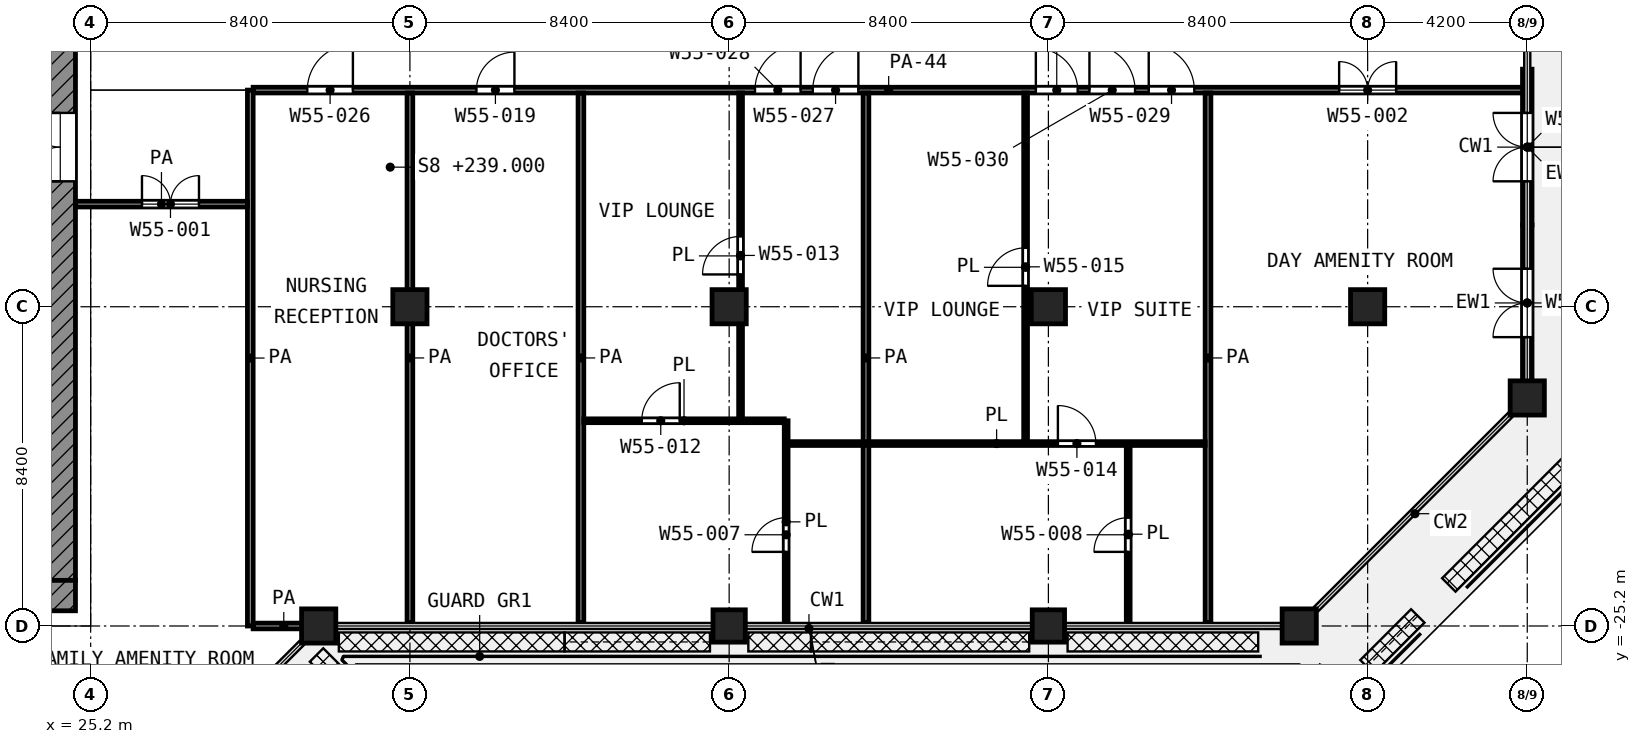
"""IFC4 building model, lengths in metres.
Left out: names, types, materials, properties, quantities, classifications, styles, units other than length and angle.
Written with IfcOpenShell. Run it as: python <this file> out.ifc"""

import sys

from ifc_helpers import new_model, si_unit, direction, frame, frame_2d, origin, origin_2d, place, context, subcontext, project, spatial, rectangle, extrude, element, fill, save


model = new_model("IFC4")
c1 = context("Model", 3, precision=1e-05, world=origin(), true_north=direction((0.0, 1.0)))
c2 = subcontext(c1, "Body", "Model", "MODEL_VIEW")
j1 = project(units=[si_unit("LENGTHUNIT", "METRE"), si_unit("PLANEANGLEUNIT", "RADIAN")], contexts=[c1])
p1 = place(None, origin())
s1 = spatial("IfcSite", under=j1, at=p1, CompositionType="ELEMENT")
p2 = place(p1, origin())
s2 = spatial("IfcBuilding", under=s1, at=p2, CompositionType="ELEMENT")
p3 = place(p2, frame((0.0, 0.0, 239.0)))
s3 = spatial("IfcBuildingStorey", under=s2, at=p3, CompositionType="ELEMENT", Elevation=239.0)
for number, where, z_axis, x_axis in (
    (1, (33.6, -16.8, 0.0), (0.0, 0.0, 1.0), (1.0, 0.0, 0.0)),
    (2, (42.0, -16.8, 0.0), (0.0, 0.0, 1.0), (1.0, 0.0, 0.0)),
    (3, (50.4, -16.8, 0.0), (0.0, 0.0, 1.0), (1.0, 0.0, 0.0)),
    (4, (58.8, -16.8, 0.0), (0.0, 0.0, 1.0), (1.0, 0.0, 0.0)),
    (5, (63.0, -19.2, 0.0), (0.0, 0.0, 1.0), (1.0, 0.0, 0.0)),
    (6, (31.2, -25.2, 0.0), (0.0, 0.0, 1.0), (1.0, 0.0, 0.0)),
):
    element("IfcColumn", number, at=place(p3, frame(where, z_axis=z_axis, x_axis=x_axis)), inside=s3, PredefinedType="COLUMN", context=c2, shape_type="SweptSolid", body=[
        extrude(rectangle(XDim=0.9, YDim=0.9, at=origin_2d()), origin(), (0.0, 0.0, 1.0), 4.2),
    ])
for number, where, z_axis, x_axis in (
    (7, (42.0, -25.2, 0.0), (0.0, 0.0, 1.0), (1.0, 0.0, 0.0)),
    (8, (50.4, -25.2, 0.0), (0.0, 0.0, 1.0), (1.0, 0.0, 0.0)),
):
    element("IfcColumn", number, at=place(p3, frame(where, z_axis=z_axis, x_axis=x_axis)), inside=s3, PredefinedType="COLUMN", context=c2, shape_type="SweptSolid", body=[
        extrude(rectangle(XDim=0.85, YDim=0.85, at=origin_2d()), origin(), (0.0, 0.0, 1.0), 4.2),
    ])
p4 = place(p3, frame((57.0, -25.2, 0.0), z_axis=(0.0, 0.0, 1.0), x_axis=(1.0, 0.0, 0.0)))
e9 = element("IfcColumn", 9, at=p4, inside=s3, PredefinedType="COLUMN", context=c2, shape_type="SweptSolid", body=[
    extrude(rectangle(XDim=0.9, YDim=0.9, at=origin_2d()), origin(), (0.0, 0.0, 1.0), 4.2),
])
p5 = place(p3, frame((63.0, -18.75, 0.0), z_axis=(0.0, 0.0, 1.0), x_axis=(0.0, 1.0, 0.0)))
e10 = element("IfcWall", 10, at=p5, inside=s3, PredefinedType="SOLIDWALL", context=c2, shape_type="SweptSolid", body=[
    extrude(rectangle(XDim=4.1, YDim=0.25, at=frame_2d((2.05, 0.0))), origin(), (0.0, 0.0, 1.0), 2.58),
])
p6 = place(p5, frame((1.15, 0.0, 0.0)))
e11 = element("IfcOpeningElement", 11, at=p6, cuts=e10, PredefinedType="OPENING", context=c2, shape_type="SweptSolid", body=[
    extrude(rectangle(XDim=1.8, YDim=2.1, at=frame_2d((0.9, 1.05))), frame((0.0, 0.135, 0.0), z_axis=(0.0, -1.0, 0.0), x_axis=(1.0, 0.0, 0.0)), (0.0, 0.0, 1.0), 0.27),
])
p7 = place(p3, frame((63.0, -14.65, 0.0), z_axis=(0.0, 0.0, 1.0), x_axis=(0.0, 1.0, 0.0)))
e12 = element("IfcWall", 12, at=p7, inside=s3, PredefinedType="SOLIDWALL", context=c2, shape_type="SweptSolid", body=[
    extrude(rectangle(XDim=4.1, YDim=0.25, at=frame_2d((2.05, 0.0))), origin(), (0.0, 0.0, 1.0), 2.58),
])
p8 = place(p7, frame((1.15, 0.0, 0.0)))
e13 = element("IfcOpeningElement", 13, at=p8, cuts=e12, PredefinedType="OPENING", context=c2, shape_type="SweptSolid", body=[
    extrude(rectangle(XDim=1.8, YDim=2.1, at=frame_2d((0.9, 1.05))), frame((0.0, 0.135, 0.0), z_axis=(0.0, -1.0, 0.0), x_axis=(1.0, 0.0, 0.0)), (0.0, 0.0, 1.0), 0.27),
])
p9 = place(p3, frame((24.4, -24.0, 0.0), z_axis=(0.0, 0.0, 1.0), x_axis=(0.0, 1.0, 0.0)))
e14 = element("IfcWall", 14, at=p9, inside=s3, PredefinedType="SHEAR", context=c2, shape_type="SweptSolid", body=[
    extrude(rectangle(XDim=18.6, YDim=0.8, at=frame_2d((9.3, 0.0))), origin(), (0.0, 0.0, 1.0), 3.6),
])
p10 = place(p9, frame((10.5, 0.0, 0.0)))
e15 = element("IfcOpeningElement", 15, at=p10, cuts=e14, PredefinedType="OPENING", context=c2, shape_type="SweptSolid", body=[
    extrude(rectangle(XDim=1.8, YDim=2.1, at=frame_2d((0.9, 1.05))), frame((0.0, 0.41, 0.0), z_axis=(0.0, -1.0, 0.0), x_axis=(1.0, 0.0, 0.0)), (0.0, 0.0, 1.0), 0.82),
])
p11 = place(p3, frame((24.4, -24.8, 0.0), z_axis=(0.0, 0.0, 1.0), x_axis=(0.0, 1.0, 0.0)))
e16 = element("IfcWall", 16, at=p11, inside=s3, PredefinedType="SHEAR", context=c2, shape_type="SweptSolid", body=[
    extrude(rectangle(XDim=0.8, YDim=0.8, at=frame_2d((0.4, 0.0))), origin(), (0.0, 0.0, 1.0), 3.6),
])
p12 = place(p3, frame((43.55, -20.4, 0.0), z_axis=(0.0, 0.0, 1.0), x_axis=(1.0, 0.0, 0.0)))
e17 = element("IfcWall", 17, at=p12, inside=s3, PredefinedType="PARTITIONING", context=c2, shape_type="SweptSolid", body=[
    extrude(rectangle(XDim=10.975, YDim=0.1, at=frame_2d((5.487, 0.0))), origin(), (0.0, 0.0, 1.0), 3.6),
])
p13 = place(p12, frame((7.1, 0.0, 0.0)))
e18 = element("IfcOpeningElement", 18, at=p13, cuts=e17, PredefinedType="OPENING", context=c2, shape_type="SweptSolid", body=[
    extrude(rectangle(XDim=1.0, YDim=2.1, at=frame_2d((0.5, 1.05))), frame((0.0, 0.06, 0.0), z_axis=(0.0, -1.0, 0.0), x_axis=(1.0, 0.0, 0.0)), (0.0, 0.0, 1.0), 0.12),
])
p14 = place(p3, frame((38.175, -19.8, 0.0), z_axis=(0.0, 0.0, 1.0), x_axis=(1.0, 0.0, 0.0)))
e19 = element("IfcWall", 19, at=p14, inside=s3, PredefinedType="PARTITIONING", context=c2, shape_type="SweptSolid", body=[
    extrude(rectangle(XDim=5.275, YDim=0.1, at=frame_2d((2.637, 0.0))), origin(), (0.0, 0.0, 1.0), 3.6),
])
p15 = place(p14, frame((1.525, 0.0, 0.0)))
e20 = element("IfcOpeningElement", 20, at=p15, cuts=e19, PredefinedType="OPENING", context=c2, shape_type="SweptSolid", body=[
    extrude(rectangle(XDim=1.0, YDim=2.1, at=frame_2d((0.5, 1.05))), frame((0.0, 0.06, 0.0), z_axis=(0.0, -1.0, 0.0), x_axis=(1.0, 0.0, 0.0)), (0.0, 0.0, 1.0), 0.12),
])
p16 = place(p3, frame((42.3, -19.75, 0.0), z_axis=(0.0, 0.0, 1.0), x_axis=(0.0, 1.0, 0.0)))
e21 = element("IfcWall", 21, at=p16, inside=s3, PredefinedType="PARTITIONING", context=c2, shape_type="SweptSolid", body=[
    extrude(rectangle(XDim=8.575, YDim=0.1, at=frame_2d((4.288, 0.0))), origin(), (0.0, 0.0, 1.0), 3.6),
])
p17 = place(p16, frame((3.8, 0.0, 0.0)))
e22 = element("IfcOpeningElement", 22, at=p17, cuts=e21, PredefinedType="OPENING", context=c2, shape_type="SweptSolid", body=[
    extrude(rectangle(XDim=1.0, YDim=2.1, at=frame_2d((0.5, 1.05))), frame((0.0, 0.06, 0.0), z_axis=(0.0, -1.0, 0.0), x_axis=(1.0, 0.0, 0.0)), (0.0, 0.0, 1.0), 0.12),
])
p18 = place(p3, frame((43.5, -25.12, 0.0), z_axis=(0.0, 0.0, 1.0), x_axis=(0.0, 1.0, 0.0)))
e23 = element("IfcWall", 23, at=p18, inside=s3, PredefinedType="PARTITIONING", context=c2, shape_type="SweptSolid", body=[
    extrude(rectangle(XDim=5.32, YDim=0.1, at=frame_2d((2.66, 0.0))), origin(), (0.0, 0.0, 1.0), 3.6),
])
p19 = place(p18, frame((1.87, 0.0, 0.0)))
e24 = element("IfcOpeningElement", 24, at=p19, cuts=e23, PredefinedType="OPENING", context=c2, shape_type="SweptSolid", body=[
    extrude(rectangle(XDim=0.9, YDim=2.1, at=frame_2d((0.45, 1.05))), frame((0.0, 0.06, 0.0), z_axis=(0.0, -1.0, 0.0), x_axis=(1.0, 0.0, 0.0)), (0.0, 0.0, 1.0), 0.12),
])
p20 = place(p3, frame((49.8, -20.35, 0.0), z_axis=(0.0, 0.0, 1.0), x_axis=(0.0, 1.0, 0.0)))
e25 = element("IfcWall", 25, at=p20, inside=s3, PredefinedType="PARTITIONING", context=c2, shape_type="SweptSolid", body=[
    extrude(rectangle(XDim=9.175, YDim=0.1, at=frame_2d((4.587, 0.0))), origin(), (0.0, 0.0, 1.0), 3.6),
])
p21 = place(p20, frame((4.1, 0.0, 0.0)))
e26 = element("IfcOpeningElement", 26, at=p21, cuts=e25, PredefinedType="OPENING", context=c2, shape_type="SweptSolid", body=[
    extrude(rectangle(XDim=1.0, YDim=2.1, at=frame_2d((0.5, 1.05))), frame((0.0, 0.06, 0.0), z_axis=(0.0, -1.0, 0.0), x_axis=(1.0, 0.0, 0.0)), (0.0, 0.0, 1.0), 0.12),
])
p22 = place(p3, frame((52.5, -25.12, 0.0), z_axis=(0.0, 0.0, 1.0), x_axis=(0.0, 1.0, 0.0)))
e27 = element("IfcWall", 27, at=p22, inside=s3, PredefinedType="PARTITIONING", context=c2, shape_type="SweptSolid", body=[
    extrude(rectangle(XDim=4.67, YDim=0.1, at=frame_2d((2.335, 0.0))), origin(), (0.0, 0.0, 1.0), 3.6),
])
p23 = place(p22, frame((1.87, 0.0, 0.0)))
e28 = element("IfcOpeningElement", 28, at=p23, cuts=e27, PredefinedType="OPENING", context=c2, shape_type="SweptSolid", body=[
    extrude(rectangle(XDim=0.9, YDim=2.1, at=frame_2d((0.45, 1.05))), frame((0.0, 0.06, 0.0), z_axis=(0.0, -1.0, 0.0), x_axis=(1.0, 0.0, 0.0)), (0.0, 0.0, 1.0), 0.12),
])
p24 = place(p3, frame((29.475, -25.2, 0.0), z_axis=(0.0, 0.0, 1.0), x_axis=(1.0, 0.0, 0.0)))
e29 = element("IfcWall", 29, at=p24, inside=s3, PredefinedType="PARTITIONING", context=c2, shape_type="SweptSolid", body=[
    extrude(rectangle(XDim=1.612, YDim=0.15, at=frame_2d((0.806, 0.0))), origin(), (0.0, 0.0, 1.0), 3.6),
])
p25 = place(p3, frame((24.8, -14.1, 0.0), z_axis=(0.0, 0.0, 1.0), x_axis=(1.0, 0.0, 0.0)))
e30 = element("IfcWall", 30, at=p25, inside=s3, PredefinedType="PARTITIONING", context=c2, shape_type="SweptSolid", body=[
    extrude(rectangle(XDim=4.525, YDim=0.15, at=frame_2d((2.262, 0.0))), origin(), (0.0, 0.0, 1.0), 3.6),
])
p26 = place(p25, frame((1.75, 0.0, 0.0)))
e31 = element("IfcOpeningElement", 31, at=p26, cuts=e30, PredefinedType="OPENING", context=c2, shape_type="SweptSolid", body=[
    extrude(rectangle(XDim=1.5, YDim=2.1, at=frame_2d((0.75, 1.05))), frame((0.0, 0.085, 0.0), z_axis=(0.0, -1.0, 0.0), x_axis=(1.0, 0.0, 0.0)), (0.0, 0.0, 1.0), 0.17),
])
p27 = place(p3, frame((29.475, -11.1, 0.0), z_axis=(0.0, 0.0, 1.0), x_axis=(1.0, 0.0, 0.0)))
e32 = element("IfcWall", 32, at=p27, inside=s3, PredefinedType="PARTITIONING", context=c2, shape_type="SweptSolid", body=[
    extrude(rectangle(XDim=33.445, YDim=0.15, at=frame_2d((16.722, 0.0))), origin(), (0.0, 0.0, 1.0), 2.7),
])
p28 = place(p27, frame((1.425, 0.0, 0.0)))
e33 = element("IfcOpeningElement", 33, at=p28, cuts=e32, PredefinedType="OPENING", context=c2, shape_type="SweptSolid", body=[
    extrude(rectangle(XDim=1.2, YDim=2.1, at=frame_2d((0.6, 1.05))), frame((0.0, 0.085, 0.0), z_axis=(0.0, -1.0, 0.0), x_axis=(1.0, 0.0, 0.0)), (0.0, 0.0, 1.0), 0.17),
])
p29 = place(p27, frame((5.875, 0.0, 0.0)))
e34 = element("IfcOpeningElement", 34, at=p29, cuts=e32, PredefinedType="OPENING", context=c2, shape_type="SweptSolid", body=[
    extrude(rectangle(XDim=1.0, YDim=2.1, at=frame_2d((0.5, 1.05))), frame((0.0, 0.085, 0.0), z_axis=(0.0, -1.0, 0.0), x_axis=(1.0, 0.0, 0.0)), (0.0, 0.0, 1.0), 0.17),
])
p30 = place(p27, frame((14.725, 0.0, 0.0)))
e35 = element("IfcOpeningElement", 35, at=p30, cuts=e32, PredefinedType="OPENING", context=c2, shape_type="SweptSolid", body=[
    extrude(rectangle(XDim=1.2, YDim=2.1, at=frame_2d((0.6, 1.05))), frame((0.0, 0.085, 0.0), z_axis=(0.0, -1.0, 0.0), x_axis=(1.0, 0.0, 0.0)), (0.0, 0.0, 1.0), 0.17),
])
p31 = place(p27, frame((13.205, 0.0, 0.0)))
e36 = element("IfcOpeningElement", 36, at=p31, cuts=e32, PredefinedType="OPENING", context=c2, shape_type="SweptSolid", body=[
    extrude(rectangle(XDim=1.2, YDim=2.1, at=frame_2d((0.6, 1.05))), frame((0.0, 0.085, 0.0), z_axis=(0.0, -1.0, 0.0), x_axis=(1.0, 0.0, 0.0)), (0.0, 0.0, 1.0), 0.17),
])
p32 = place(p27, frame((23.565, 0.0, 0.0)))
e37 = element("IfcOpeningElement", 37, at=p32, cuts=e32, PredefinedType="OPENING", context=c2, shape_type="SweptSolid", body=[
    extrude(rectangle(XDim=1.2, YDim=2.1, at=frame_2d((0.6, 1.05))), frame((0.0, 0.085, 0.0), z_axis=(0.0, -1.0, 0.0), x_axis=(1.0, 0.0, 0.0)), (0.0, 0.0, 1.0), 0.17),
])
p33 = place(p27, frame((22.005, 0.0, 0.0)))
e38 = element("IfcOpeningElement", 38, at=p33, cuts=e32, PredefinedType="OPENING", context=c2, shape_type="SweptSolid", body=[
    extrude(rectangle(XDim=1.2, YDim=2.1, at=frame_2d((0.6, 1.05))), frame((0.0, 0.085, 0.0), z_axis=(0.0, -1.0, 0.0), x_axis=(1.0, 0.0, 0.0)), (0.0, 0.0, 1.0), 0.17),
])
p34 = place(p27, frame((20.595, 0.0, 0.0)))
e39 = element("IfcOpeningElement", 39, at=p34, cuts=e32, PredefinedType="OPENING", context=c2, shape_type="SweptSolid", body=[
    extrude(rectangle(XDim=1.1, YDim=2.1, at=frame_2d((0.55, 1.05))), frame((0.0, 0.085, 0.0), z_axis=(0.0, -1.0, 0.0), x_axis=(1.0, 0.0, 0.0)), (0.0, 0.0, 1.0), 0.17),
])
p35 = place(p27, frame((28.575, 0.0, 0.0)))
e40 = element("IfcOpeningElement", 40, at=p35, cuts=e32, PredefinedType="OPENING", context=c2, shape_type="SweptSolid", body=[
    extrude(rectangle(XDim=1.5, YDim=2.1, at=frame_2d((0.75, 1.05))), frame((0.0, 0.085, 0.0), z_axis=(0.0, -1.0, 0.0), x_axis=(1.0, 0.0, 0.0)), (0.0, 0.0, 1.0), 0.17),
])
p36 = place(p3, frame((29.4, -25.2, 0.0), z_axis=(0.0, 0.0, 1.0), x_axis=(0.0, 1.0, 0.0)))
e41 = element("IfcWall", 41, at=p36, inside=s3, PredefinedType="PARTITIONING", context=c2, shape_type="SweptSolid", body=[
    extrude(rectangle(XDim=14.1, YDim=0.15, at=frame_2d((7.05, 0.0))), origin(), (0.0, 0.0, 1.0), 3.6),
])
for number, where, z_axis, x_axis in (
    (42, (33.6, -25.12, 0.0), (0.0, 0.0, 1.0), (0.0, 1.0, 0.0)),
    (43, (38.1, -25.12, 0.0), (0.0, 0.0, 1.0), (0.0, 1.0, 0.0)),
    (44, (45.6, -25.12, 0.0), (0.0, 0.0, 1.0), (0.0, 1.0, 0.0)),
    (45, (54.6, -25.12, 0.0), (0.0, 0.0, 1.0), (0.0, 1.0, 0.0)),
):
    element("IfcWall", number, at=place(p3, frame(where, z_axis=z_axis, x_axis=x_axis)), inside=s3, PredefinedType="PARTITIONING", context=c2, shape_type="SweptSolid", body=[
        extrude(rectangle(XDim=13.945, YDim=0.15, at=frame_2d((6.973, 0.0))), origin(), (0.0, 0.0, 1.0), 3.6),
    ])
p37 = place(p6, origin())
e46 = element("IfcDoor", 46, at=p37, inside=s3, OperationType="DOUBLE_DOOR_SINGLE_SWING", PredefinedType="DOOR", context=c2, shape_type="SweptSolid", body=[
    extrude(rectangle(XDim=1.8, YDim=2.1, at=frame_2d((0.9, 1.05))), frame((0.0, 0.025, 0.0), z_axis=(0.0, -1.0, 0.0), x_axis=(1.0, 0.0, 0.0)), (0.0, 0.0, 1.0), 0.05),
])
fill(e11, e46)
p38 = place(p8, origin())
e47 = element("IfcDoor", 47, at=p38, inside=s3, OperationType="DOUBLE_DOOR_SINGLE_SWING", PredefinedType="DOOR", context=c2, shape_type="SweptSolid", body=[
    extrude(rectangle(XDim=1.8, YDim=2.1, at=frame_2d((0.9, 1.05))), frame((0.0, 0.025, 0.0), z_axis=(0.0, -1.0, 0.0), x_axis=(1.0, 0.0, 0.0)), (0.0, 0.0, 1.0), 0.05),
])
fill(e13, e47)
p39 = place(p10, origin())
e48 = element("IfcDoor", 48, at=p39, inside=s3, OperationType="DOUBLE_DOOR_SINGLE_SWING", PredefinedType="DOOR", context=c2, shape_type="SweptSolid", body=[
    extrude(rectangle(XDim=1.8, YDim=2.1, at=frame_2d((0.9, 1.05))), frame((0.0, 0.025, 0.0), z_axis=(0.0, -1.0, 0.0), x_axis=(1.0, 0.0, 0.0)), (0.0, 0.0, 1.0), 0.05),
])
fill(e15, e48)
p40 = place(p26, origin())
e49 = element("IfcDoor", 49, at=p40, inside=s3, OperationType="DOUBLE_DOOR_SINGLE_SWING", PredefinedType="DOOR", context=c2, shape_type="SweptSolid", body=[
    extrude(rectangle(XDim=1.5, YDim=2.1, at=frame_2d((0.75, 1.05))), frame((0.0, 0.025, 0.0), z_axis=(0.0, -1.0, 0.0), x_axis=(1.0, 0.0, 0.0)), (0.0, 0.0, 1.0), 0.05),
])
fill(e31, e49)
p41 = place(p28, origin())
e50 = element("IfcDoor", 50, at=p41, inside=s3, OperationType="SINGLE_SWING_RIGHT", PredefinedType="DOOR", context=c2, shape_type="SweptSolid", body=[
    extrude(rectangle(XDim=1.2, YDim=2.1, at=frame_2d((0.6, 1.05))), frame((0.0, 0.025, 0.0), z_axis=(0.0, -1.0, 0.0), x_axis=(1.0, 0.0, 0.0)), (0.0, 0.0, 1.0), 0.05),
])
fill(e33, e50)
p42 = place(p29, origin())
e51 = element("IfcDoor", 51, at=p42, inside=s3, OperationType="SINGLE_SWING_RIGHT", PredefinedType="DOOR", context=c2, shape_type="SweptSolid", body=[
    extrude(rectangle(XDim=1.0, YDim=2.1, at=frame_2d((0.5, 1.05))), frame((0.0, 0.025, 0.0), z_axis=(0.0, -1.0, 0.0), x_axis=(1.0, 0.0, 0.0)), (0.0, 0.0, 1.0), 0.05),
])
fill(e34, e51)
p43 = place(p30, origin())
e52 = element("IfcDoor", 52, at=p43, inside=s3, OperationType="SINGLE_SWING_RIGHT", PredefinedType="DOOR", context=c2, shape_type="SweptSolid", body=[
    extrude(rectangle(XDim=1.2, YDim=2.1, at=frame_2d((0.6, 1.05))), frame((0.0, 0.025, 0.0), z_axis=(0.0, -1.0, 0.0), x_axis=(1.0, 0.0, 0.0)), (0.0, 0.0, 1.0), 0.05),
])
fill(e35, e52)
p44 = place(p31, origin())
e53 = element("IfcDoor", 53, at=p44, inside=s3, OperationType="SINGLE_SWING_RIGHT", PredefinedType="DOOR", context=c2, shape_type="SweptSolid", body=[
    extrude(rectangle(XDim=1.2, YDim=2.1, at=frame_2d((0.6, 1.05))), frame((0.0, 0.025, 0.0), z_axis=(0.0, -1.0, 0.0), x_axis=(1.0, 0.0, 0.0)), (0.0, 0.0, 1.0), 0.05),
])
fill(e36, e53)
p45 = place(p15, origin())
e54 = element("IfcDoor", 54, at=p45, inside=s3, OperationType="SINGLE_SWING_RIGHT", PredefinedType="DOOR", context=c2, shape_type="SweptSolid", body=[
    extrude(rectangle(XDim=1.0, YDim=2.1, at=frame_2d((0.5, 1.05))), frame((0.0, 0.025, 0.0), z_axis=(0.0, -1.0, 0.0), x_axis=(1.0, 0.0, 0.0)), (0.0, 0.0, 1.0), 0.05),
])
fill(e20, e54)
p46 = place(p17, origin())
e55 = element("IfcDoor", 55, at=p46, inside=s3, OperationType="SINGLE_SWING_LEFT", PredefinedType="DOOR", context=c2, shape_type="SweptSolid", body=[
    extrude(rectangle(XDim=1.0, YDim=2.1, at=frame_2d((0.5, 1.05))), frame((0.0, 0.025, 0.0), z_axis=(0.0, -1.0, 0.0), x_axis=(1.0, 0.0, 0.0)), (0.0, 0.0, 1.0), 0.05),
])
fill(e22, e55)
p47 = place(p19, origin())
e56 = element("IfcDoor", 56, at=p47, inside=s3, OperationType="SINGLE_SWING_LEFT", PredefinedType="DOOR", context=c2, shape_type="SweptSolid", body=[
    extrude(rectangle(XDim=0.9, YDim=2.1, at=frame_2d((0.45, 1.05))), frame((0.0, 0.025, 0.0), z_axis=(0.0, -1.0, 0.0), x_axis=(1.0, 0.0, 0.0)), (0.0, 0.0, 1.0), 0.05),
])
fill(e24, e56)
p48 = place(p32, origin())
e57 = element("IfcDoor", 57, at=p48, inside=s3, OperationType="SINGLE_SWING_LEFT", PredefinedType="DOOR", context=c2, shape_type="SweptSolid", body=[
    extrude(rectangle(XDim=1.2, YDim=2.1, at=frame_2d((0.6, 1.05))), frame((0.0, 0.025, 0.0), z_axis=(0.0, -1.0, 0.0), x_axis=(1.0, 0.0, 0.0)), (0.0, 0.0, 1.0), 0.05),
])
fill(e37, e57)
p49 = place(p33, origin())
e58 = element("IfcDoor", 58, at=p49, inside=s3, OperationType="SINGLE_SWING_LEFT", PredefinedType="DOOR", context=c2, shape_type="SweptSolid", body=[
    extrude(rectangle(XDim=1.2, YDim=2.1, at=frame_2d((0.6, 1.05))), frame((0.0, 0.025, 0.0), z_axis=(0.0, -1.0, 0.0), x_axis=(1.0, 0.0, 0.0)), (0.0, 0.0, 1.0), 0.05),
])
fill(e38, e58)
p50 = place(p34, origin())
e59 = element("IfcDoor", 59, at=p50, inside=s3, OperationType="SINGLE_SWING_LEFT", PredefinedType="DOOR", context=c2, shape_type="SweptSolid", body=[
    extrude(rectangle(XDim=1.1, YDim=2.1, at=frame_2d((0.55, 1.05))), frame((0.0, 0.025, 0.0), z_axis=(0.0, -1.0, 0.0), x_axis=(1.0, 0.0, 0.0)), (0.0, 0.0, 1.0), 0.05),
])
fill(e39, e59)
p51 = place(p13, origin())
e60 = element("IfcDoor", 60, at=p51, inside=s3, OperationType="SINGLE_SWING_LEFT", PredefinedType="DOOR", context=c2, shape_type="SweptSolid", body=[
    extrude(rectangle(XDim=1.0, YDim=2.1, at=frame_2d((0.5, 1.05))), frame((0.0, 0.025, 0.0), z_axis=(0.0, -1.0, 0.0), x_axis=(1.0, 0.0, 0.0)), (0.0, 0.0, 1.0), 0.05),
])
fill(e18, e60)
p52 = place(p21, origin())
e61 = element("IfcDoor", 61, at=p52, inside=s3, OperationType="SINGLE_SWING_LEFT", PredefinedType="DOOR", context=c2, shape_type="SweptSolid", body=[
    extrude(rectangle(XDim=1.0, YDim=2.1, at=frame_2d((0.5, 1.05))), frame((0.0, 0.025, 0.0), z_axis=(0.0, -1.0, 0.0), x_axis=(1.0, 0.0, 0.0)), (0.0, 0.0, 1.0), 0.05),
])
fill(e26, e61)
p53 = place(p23, origin())
e62 = element("IfcDoor", 62, at=p53, inside=s3, OperationType="SINGLE_SWING_LEFT", PredefinedType="DOOR", context=c2, shape_type="SweptSolid", body=[
    extrude(rectangle(XDim=0.9, YDim=2.1, at=frame_2d((0.45, 1.05))), frame((0.0, 0.025, 0.0), z_axis=(0.0, -1.0, 0.0), x_axis=(1.0, 0.0, 0.0)), (0.0, 0.0, 1.0), 0.05),
])
fill(e28, e62)
p54 = place(p35, origin())
e63 = element("IfcDoor", 63, at=p54, inside=s3, OperationType="DOUBLE_DOOR_SINGLE_SWING", PredefinedType="DOOR", context=c2, shape_type="SweptSolid", body=[
    extrude(rectangle(XDim=1.5, YDim=2.1, at=frame_2d((0.75, 1.05))), frame((0.0, 0.025, 0.0), z_axis=(0.0, -1.0, 0.0), x_axis=(1.0, 0.0, 0.0)), (0.0, 0.0, 1.0), 0.05),
])
fill(e40, e63)
save(model, sys.argv[1])
